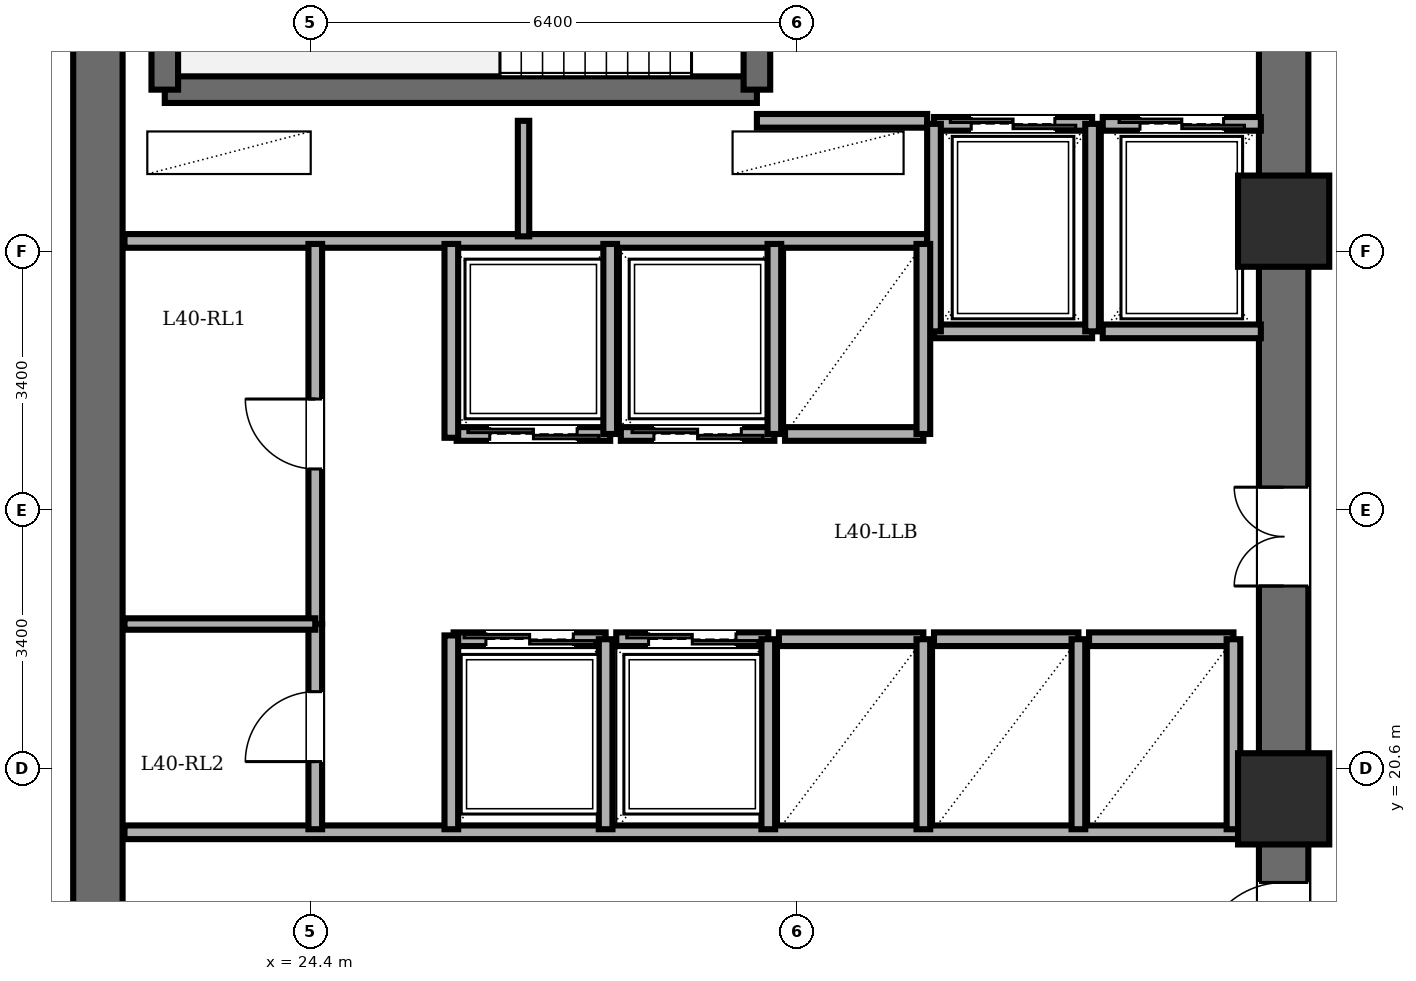
"""IFC4 building model, lengths in metres.
Left out: names, types, materials, properties, quantities, classifications, styles, units other than length and angle.
Written with IfcOpenShell. Run it as: python <this file> out.ifc"""

import sys

from ifc_helpers import new_model, si_unit, direction, frame, frame_2d, origin, origin_2d, place, context, subcontext, project, spatial, rectangle, extrude, element, fill, save


model = new_model("IFC4")
c1 = context("Model", 3, precision=1e-05, world=origin(), true_north=direction((0.0, 1.0)))
c2 = subcontext(c1, "Body", "Model", "MODEL_VIEW")
j1 = project(units=[si_unit("LENGTHUNIT", "METRE"), si_unit("PLANEANGLEUNIT", "RADIAN")], contexts=[c1])
p1 = place(None, origin())
s1 = spatial("IfcSite", under=j1, at=p1, CompositionType="ELEMENT")
p2 = place(p1, origin())
s2 = spatial("IfcBuilding", under=s1, at=p2, CompositionType="ELEMENT")
p3 = place(p2, frame((0.0, 0.0, 154.6)))
s3 = spatial("IfcBuildingStorey", under=s2, at=p3, CompositionType="ELEMENT", Elevation=154.6)
for number, where, z_axis, x_axis in (
    (1, (37.2, 20.2, 0.0), (0.0, 0.0, 1.0), (1.0, 0.0, 0.0)),
    (2, (37.2, 27.8, 0.0), (0.0, 0.0, 1.0), (1.0, 0.0, 0.0)),
):
    element("IfcColumn", number, at=place(p3, frame(where, z_axis=z_axis, x_axis=x_axis)), inside=s3, PredefinedType="COLUMN", context=c2, shape_type="SweptSolid", body=[
        extrude(rectangle(XDim=1.2, YDim=1.2, at=origin_2d()), origin(), (0.0, 0.0, 1.0), 3.6),
    ])
p4 = place(p3, frame((21.6, 14.4, 0.0), z_axis=(0.0, 0.0, 1.0), x_axis=(0.0, 1.0, 0.0)))
e3 = element("IfcWall", 3, at=p4, inside=s3, PredefinedType="SHEAR", context=c2, shape_type="SweptSolid", body=[
    extrude(rectangle(XDim=19.2, YDim=0.65, at=frame_2d((9.6, 0.0))), origin(), (0.0, 0.0, 1.0), 3.4),
])
p5 = place(p3, frame((37.2, 14.4, 0.0), z_axis=(0.0, 0.0, 1.0), x_axis=(0.0, 1.0, 0.0)))
e4 = element("IfcWall", 4, at=p5, inside=s3, PredefinedType="SHEAR", context=c2, shape_type="SweptSolid", body=[
    extrude(rectangle(XDim=19.2, YDim=0.65, at=frame_2d((9.6, 0.0))), origin(), (0.0, 0.0, 1.0), 3.4),
])
p6 = place(p5, frame((15.8, 0.0, 0.0)))
e5 = element("IfcOpeningElement", 5, at=p6, cuts=e4, PredefinedType="OPENING", context=c2, shape_type="SweptSolid", body=[
    extrude(rectangle(XDim=1.15, YDim=2.15, at=frame_2d((0.575, 1.075))), frame((0.0, 0.335, 0.0), z_axis=(0.0, -1.0, 0.0), x_axis=(1.0, 0.0, 0.0)), (0.0, 0.0, 1.0), 0.67),
])
p7 = place(p5, frame((3.6, 0.0, 0.0)))
e6 = element("IfcOpeningElement", 6, at=p7, cuts=e4, PredefinedType="OPENING", context=c2, shape_type="SweptSolid", body=[
    extrude(rectangle(XDim=1.1, YDim=2.15, at=frame_2d((0.55, 1.075))), frame((0.0, 0.335, 0.0), z_axis=(0.0, -1.0, 0.0), x_axis=(1.0, 0.0, 0.0)), (0.0, 0.0, 1.0), 0.67),
])
p8 = place(p5, frame((8.6, 0.0, 0.0)))
e7 = element("IfcOpeningElement", 7, at=p8, cuts=e4, PredefinedType="OPENING", context=c2, shape_type="SweptSolid", body=[
    extrude(rectangle(XDim=1.3, YDim=2.2, at=frame_2d((0.65, 1.1))), frame((0.0, 0.335, 0.0), z_axis=(0.0, -1.0, 0.0), x_axis=(1.0, 0.0, 0.0)), (0.0, 0.0, 1.0), 0.67),
])
p9 = place(p3, frame((22.48, 29.53, 0.0), z_axis=(0.0, 0.0, 1.0), x_axis=(1.0, 0.0, 0.0)))
e8 = element("IfcWall", 8, at=p9, inside=s3, PredefinedType="SOLIDWALL", context=c2, shape_type="SweptSolid", body=[
    extrude(rectangle(XDim=7.79, YDim=0.35, at=frame_2d((3.895, 0.0))), origin(), (0.0, 0.0, 1.0), 3.4),
])
p10 = place(p3, frame((22.48, 29.53, 0.0), z_axis=(0.0, 0.0, 1.0), x_axis=(0.0, 1.0, 0.0)))
e9 = element("IfcWall", 9, at=p10, inside=s3, PredefinedType="SOLIDWALL", context=c2, shape_type="SweptSolid", body=[
    extrude(rectangle(XDim=3.58, YDim=0.35, at=frame_2d((1.79, 0.0))), origin(), (0.0, 0.0, 1.0), 3.4),
])
p11 = place(p3, frame((30.27, 29.53, 0.0), z_axis=(0.0, 0.0, 1.0), x_axis=(0.0, 1.0, 0.0)))
e10 = element("IfcWall", 10, at=p11, inside=s3, PredefinedType="SOLIDWALL", context=c2, shape_type="SweptSolid", body=[
    extrude(rectangle(XDim=3.58, YDim=0.35, at=frame_2d((1.79, 0.0))), origin(), (0.0, 0.0, 1.0), 3.4),
])
p12 = place(p11, frame((1.25, 0.0, 0.0)))
e11 = element("IfcOpeningElement", 11, at=p12, cuts=e10, PredefinedType="OPENING", context=c2, shape_type="SweptSolid", body=[
    extrude(rectangle(XDim=1.1, YDim=2.15, at=frame_2d((0.55, 1.075))), frame((0.0, 0.185, 0.0), z_axis=(0.0, -1.0, 0.0), x_axis=(1.0, 0.0, 0.0)), (0.0, 0.0, 1.0), 0.37),
])
p13 = place(p3, frame((30.27, 29.12, 0.0), z_axis=(0.0, 0.0, 1.0), x_axis=(1.0, 0.0, 0.0)))
e12 = element("IfcWall", 12, at=p13, inside=s3, PredefinedType="PARTITIONING", context=c2, shape_type="SweptSolid", body=[
    extrude(rectangle(XDim=2.24, YDim=0.18, at=frame_2d((1.12, 0.0))), origin(), (0.0, 0.0, 1.0), 3.4),
])
p14 = place(p3, frame((21.95, 27.54, 0.0), z_axis=(0.0, 0.0, 1.0), x_axis=(1.0, 0.0, 0.0)))
e13 = element("IfcWall", 13, at=p14, inside=s3, PredefinedType="PARTITIONING", context=c2, shape_type="SweptSolid", body=[
    extrude(rectangle(XDim=10.56, YDim=0.18, at=frame_2d((5.28, 0.0))), origin(), (0.0, 0.0, 1.0), 3.4),
])
p15 = place(p3, frame((27.2, 27.6, 0.0), z_axis=(0.0, 0.0, 1.0), x_axis=(0.0, 1.0, 0.0)))
e14 = element("IfcWall", 14, at=p15, inside=s3, PredefinedType="PARTITIONING", context=c2, shape_type="SweptSolid", body=[
    extrude(rectangle(XDim=1.52, YDim=0.15, at=frame_2d((0.76, 0.0))), origin(), (0.0, 0.0, 1.0), 3.4),
])
p16 = place(p3, frame((21.95, 19.76, 0.0), z_axis=(0.0, 0.0, 1.0), x_axis=(1.0, 0.0, 0.0)))
e15 = element("IfcWall", 15, at=p16, inside=s3, PredefinedType="PARTITIONING", context=c2, shape_type="SweptSolid", body=[
    extrude(rectangle(XDim=14.87, YDim=0.18, at=frame_2d((7.435, 0.0))), origin(), (0.0, 0.0, 1.0), 3.4),
])
p17 = place(p3, frame((32.6, 29.08, 0.0), z_axis=(0.0, 0.0, 1.0), x_axis=(1.0, 0.0, 0.0)))
e16 = element("IfcWall", 16, at=p17, inside=s3, PredefinedType="PARTITIONING", context=c2, shape_type="SweptSolid", body=[
    extrude(rectangle(XDim=2.08, YDim=0.18, at=frame_2d((1.04, 0.0))), origin(), (0.0, 0.0, 1.0), 3.4),
])
p18 = place(p17, frame((0.49, 0.0, 0.0)))
e17 = element("IfcOpeningElement", 17, at=p18, cuts=e16, PredefinedType="OPENING", context=c2, shape_type="SweptSolid", body=[
    extrude(rectangle(XDim=1.1, YDim=2.2, at=frame_2d((0.55, 1.1))), frame((0.0, 0.1, 0.0), z_axis=(0.0, -1.0, 0.0), x_axis=(1.0, 0.0, 0.0)), (0.0, 0.0, 1.0), 0.2),
])
p19 = place(p3, frame((34.68, 26.35, 0.0), z_axis=(0.0, 0.0, 1.0), x_axis=(-1.0, 0.0, 0.0)))
e18 = element("IfcWall", 18, at=p19, inside=s3, PredefinedType="PARTITIONING", context=c2, shape_type="SweptSolid", body=[
    extrude(rectangle(XDim=2.08, YDim=0.18, at=frame_2d((1.04, 0.0))), origin(), (0.0, 0.0, 1.0), 3.4),
])
for number, where, z_axis, x_axis in (
    (19, (34.68, 26.35, 0.0), (0.0, 0.0, 1.0), (0.0, 1.0, 0.0)),
    (20, (32.6, 29.08, 0.0), (0.0, 0.0, 1.0), (0.0, -1.0, 0.0)),
):
    element("IfcWall", number, at=place(p3, frame(where, z_axis=z_axis, x_axis=x_axis)), inside=s3, PredefinedType="PARTITIONING", context=c2, shape_type="SweptSolid", body=[
        extrude(rectangle(XDim=2.73, YDim=0.18, at=frame_2d((1.365, 0.0))), origin(), (0.0, 0.0, 1.0), 3.4),
    ])
p20 = place(p3, frame((34.82, 29.08, 0.0), z_axis=(0.0, 0.0, 1.0), x_axis=(1.0, 0.0, 0.0)))
e21 = element("IfcWall", 21, at=p20, inside=s3, PredefinedType="PARTITIONING", context=c2, shape_type="SweptSolid", body=[
    extrude(rectangle(XDim=2.08, YDim=0.18, at=frame_2d((1.04, 0.0))), origin(), (0.0, 0.0, 1.0), 3.4),
])
p21 = place(p20, frame((0.49, 0.0, 0.0)))
e22 = element("IfcOpeningElement", 22, at=p21, cuts=e21, PredefinedType="OPENING", context=c2, shape_type="SweptSolid", body=[
    extrude(rectangle(XDim=1.1, YDim=2.2, at=frame_2d((0.55, 1.1))), frame((0.0, 0.1, 0.0), z_axis=(0.0, -1.0, 0.0), x_axis=(1.0, 0.0, 0.0)), (0.0, 0.0, 1.0), 0.2),
])
p22 = place(p3, frame((36.9, 26.35, 0.0), z_axis=(0.0, 0.0, 1.0), x_axis=(-1.0, 0.0, 0.0)))
e23 = element("IfcWall", 23, at=p22, inside=s3, PredefinedType="PARTITIONING", context=c2, shape_type="SweptSolid", body=[
    extrude(rectangle(XDim=2.08, YDim=0.18, at=frame_2d((1.04, 0.0))), origin(), (0.0, 0.0, 1.0), 3.4),
])
p23 = place(p3, frame((28.34, 25.0, 0.0), z_axis=(0.0, 0.0, 1.0), x_axis=(-1.0, 0.0, 0.0)))
e24 = element("IfcWall", 24, at=p23, inside=s3, PredefinedType="PARTITIONING", context=c2, shape_type="SweptSolid", body=[
    extrude(rectangle(XDim=2.02, YDim=0.18, at=frame_2d((1.01, 0.0))), origin(), (0.0, 0.0, 1.0), 3.4),
])
p24 = place(p23, frame((0.435, 0.0, 0.0)))
e25 = element("IfcOpeningElement", 25, at=p24, cuts=e24, PredefinedType="OPENING", context=c2, shape_type="SweptSolid", body=[
    extrude(rectangle(XDim=1.15, YDim=2.2, at=frame_2d((0.575, 1.1))), frame((0.0, 0.1, 0.0), z_axis=(0.0, -1.0, 0.0), x_axis=(1.0, 0.0, 0.0)), (0.0, 0.0, 1.0), 0.2),
])
p25 = place(p3, frame((28.34, 25.0, 0.0), z_axis=(0.0, 0.0, 1.0), x_axis=(0.0, 1.0, 0.0)))
e26 = element("IfcWall", 26, at=p25, inside=s3, PredefinedType="PARTITIONING", context=c2, shape_type="SweptSolid", body=[
    extrude(rectangle(XDim=2.5, YDim=0.18, at=frame_2d((1.25, 0.0))), origin(), (0.0, 0.0, 1.0), 3.4),
])
p26 = place(p3, frame((30.5, 25.0, 0.0), z_axis=(0.0, 0.0, 1.0), x_axis=(-1.0, 0.0, 0.0)))
e27 = element("IfcWall", 27, at=p26, inside=s3, PredefinedType="PARTITIONING", context=c2, shape_type="SweptSolid", body=[
    extrude(rectangle(XDim=2.02, YDim=0.18, at=frame_2d((1.01, 0.0))), origin(), (0.0, 0.0, 1.0), 3.4),
])
p27 = place(p26, frame((0.435, 0.0, 0.0)))
e28 = element("IfcOpeningElement", 28, at=p27, cuts=e27, PredefinedType="OPENING", context=c2, shape_type="SweptSolid", body=[
    extrude(rectangle(XDim=1.15, YDim=2.2, at=frame_2d((0.575, 1.1))), frame((0.0, 0.1, 0.0), z_axis=(0.0, -1.0, 0.0), x_axis=(1.0, 0.0, 0.0)), (0.0, 0.0, 1.0), 0.2),
])
p28 = place(p3, frame((30.5, 25.0, 0.0), z_axis=(0.0, 0.0, 1.0), x_axis=(0.0, 1.0, 0.0)))
e29 = element("IfcWall", 29, at=p28, inside=s3, PredefinedType="PARTITIONING", context=c2, shape_type="SweptSolid", body=[
    extrude(rectangle(XDim=2.5, YDim=0.18, at=frame_2d((1.25, 0.0))), origin(), (0.0, 0.0, 1.0), 3.4),
])
p29 = place(p3, frame((26.28, 22.3, 0.0), z_axis=(0.0, 0.0, 1.0), x_axis=(1.0, 0.0, 0.0)))
e30 = element("IfcWall", 30, at=p29, inside=s3, PredefinedType="PARTITIONING", context=c2, shape_type="SweptSolid", body=[
    extrude(rectangle(XDim=2.0, YDim=0.18, at=frame_2d((1.0, 0.0))), origin(), (0.0, 0.0, 1.0), 3.4),
])
p30 = place(p29, frame((0.425, 0.0, 0.0)))
e31 = element("IfcOpeningElement", 31, at=p30, cuts=e30, PredefinedType="OPENING", context=c2, shape_type="SweptSolid", body=[
    extrude(rectangle(XDim=1.15, YDim=2.2, at=frame_2d((0.575, 1.1))), frame((0.0, 0.1, 0.0), z_axis=(0.0, -1.0, 0.0), x_axis=(1.0, 0.0, 0.0)), (0.0, 0.0, 1.0), 0.2),
])
p31 = place(p3, frame((28.28, 19.8, 0.0), z_axis=(0.0, 0.0, 1.0), x_axis=(0.0, 1.0, 0.0)))
e32 = element("IfcWall", 32, at=p31, inside=s3, PredefinedType="PARTITIONING", context=c2, shape_type="SweptSolid", body=[
    extrude(rectangle(XDim=2.5, YDim=0.18, at=frame_2d((1.25, 0.0))), origin(), (0.0, 0.0, 1.0), 3.4),
])
p32 = place(p3, frame((28.42, 22.3, 0.0), z_axis=(0.0, 0.0, 1.0), x_axis=(1.0, 0.0, 0.0)))
e33 = element("IfcWall", 33, at=p32, inside=s3, PredefinedType="PARTITIONING", context=c2, shape_type="SweptSolid", body=[
    extrude(rectangle(XDim=2.0, YDim=0.18, at=frame_2d((1.0, 0.0))), origin(), (0.0, 0.0, 1.0), 3.4),
])
p33 = place(p32, frame((0.425, 0.0, 0.0)))
e34 = element("IfcOpeningElement", 34, at=p33, cuts=e33, PredefinedType="OPENING", context=c2, shape_type="SweptSolid", body=[
    extrude(rectangle(XDim=1.15, YDim=2.2, at=frame_2d((0.575, 1.1))), frame((0.0, 0.1, 0.0), z_axis=(0.0, -1.0, 0.0), x_axis=(1.0, 0.0, 0.0)), (0.0, 0.0, 1.0), 0.2),
])
p34 = place(p3, frame((30.42, 19.8, 0.0), z_axis=(0.0, 0.0, 1.0), x_axis=(0.0, 1.0, 0.0)))
e35 = element("IfcWall", 35, at=p34, inside=s3, PredefinedType="PARTITIONING", context=c2, shape_type="SweptSolid", body=[
    extrude(rectangle(XDim=2.5, YDim=0.18, at=frame_2d((1.25, 0.0))), origin(), (0.0, 0.0, 1.0), 3.4),
])
p35 = place(p3, frame((32.46, 25.0, 0.0), z_axis=(0.0, 0.0, 1.0), x_axis=(-1.0, 0.0, 0.0)))
e36 = element("IfcWall", 36, at=p35, inside=s3, PredefinedType="PARTITIONING", context=c2, shape_type="SweptSolid", body=[
    extrude(rectangle(XDim=1.82, YDim=0.18, at=frame_2d((0.91, 0.0))), origin(), (0.0, 0.0, 1.0), 3.4),
])
p36 = place(p3, frame((32.46, 25.0, 0.0), z_axis=(0.0, 0.0, 1.0), x_axis=(0.0, 1.0, 0.0)))
e37 = element("IfcWall", 37, at=p36, inside=s3, PredefinedType="PARTITIONING", context=c2, shape_type="SweptSolid", body=[
    extrude(rectangle(XDim=2.5, YDim=0.18, at=frame_2d((1.25, 0.0))), origin(), (0.0, 0.0, 1.0), 3.4),
])
p37 = place(p3, frame((30.56, 22.3, 0.0), z_axis=(0.0, 0.0, 1.0), x_axis=(1.0, 0.0, 0.0)))
e38 = element("IfcWall", 38, at=p37, inside=s3, PredefinedType="PARTITIONING", context=c2, shape_type="SweptSolid", body=[
    extrude(rectangle(XDim=1.9, YDim=0.18, at=frame_2d((0.95, 0.0))), origin(), (0.0, 0.0, 1.0), 3.4),
])
p38 = place(p3, frame((32.46, 19.8, 0.0), z_axis=(0.0, 0.0, 1.0), x_axis=(0.0, 1.0, 0.0)))
e39 = element("IfcWall", 39, at=p38, inside=s3, PredefinedType="PARTITIONING", context=c2, shape_type="SweptSolid", body=[
    extrude(rectangle(XDim=2.5, YDim=0.18, at=frame_2d((1.25, 0.0))), origin(), (0.0, 0.0, 1.0), 3.4),
])
p39 = place(p3, frame((32.6, 22.3, 0.0), z_axis=(0.0, 0.0, 1.0), x_axis=(1.0, 0.0, 0.0)))
e40 = element("IfcWall", 40, at=p39, inside=s3, PredefinedType="PARTITIONING", context=c2, shape_type="SweptSolid", body=[
    extrude(rectangle(XDim=1.9, YDim=0.18, at=frame_2d((0.95, 0.0))), origin(), (0.0, 0.0, 1.0), 3.4),
])
p40 = place(p3, frame((34.5, 19.8, 0.0), z_axis=(0.0, 0.0, 1.0), x_axis=(0.0, 1.0, 0.0)))
e41 = element("IfcWall", 41, at=p40, inside=s3, PredefinedType="PARTITIONING", context=c2, shape_type="SweptSolid", body=[
    extrude(rectangle(XDim=2.5, YDim=0.18, at=frame_2d((1.25, 0.0))), origin(), (0.0, 0.0, 1.0), 3.4),
])
p41 = place(p3, frame((34.64, 22.3, 0.0), z_axis=(0.0, 0.0, 1.0), x_axis=(1.0, 0.0, 0.0)))
e42 = element("IfcWall", 42, at=p41, inside=s3, PredefinedType="PARTITIONING", context=c2, shape_type="SweptSolid", body=[
    extrude(rectangle(XDim=1.9, YDim=0.18, at=frame_2d((0.95, 0.0))), origin(), (0.0, 0.0, 1.0), 3.4),
])
p42 = place(p3, frame((36.54, 19.8, 0.0), z_axis=(0.0, 0.0, 1.0), x_axis=(0.0, 1.0, 0.0)))
e43 = element("IfcWall", 43, at=p42, inside=s3, PredefinedType="PARTITIONING", context=c2, shape_type="SweptSolid", body=[
    extrude(rectangle(XDim=2.5, YDim=0.18, at=frame_2d((1.25, 0.0))), origin(), (0.0, 0.0, 1.0), 3.4),
])
p43 = place(p3, frame((24.46, 22.5, 0.0), z_axis=(0.0, 0.0, 1.0), x_axis=(0.0, 1.0, 0.0)))
e44 = element("IfcWall", 44, at=p43, inside=s3, PredefinedType="PARTITIONING", context=c2, shape_type="SweptSolid", body=[
    extrude(rectangle(XDim=5.0, YDim=0.18, at=frame_2d((2.5, 0.0))), origin(), (0.0, 0.0, 1.0), 3.4),
])
p44 = place(p43, frame((2.04, 0.0, 0.0)))
e45 = element("IfcOpeningElement", 45, at=p44, cuts=e44, PredefinedType="OPENING", context=c2, shape_type="SweptSolid", body=[
    extrude(rectangle(XDim=0.92, YDim=2.1, at=frame_2d((0.46, 1.05))), frame((0.0, 0.1, 0.0), z_axis=(0.0, -1.0, 0.0), x_axis=(1.0, 0.0, 0.0)), (0.0, 0.0, 1.0), 0.2),
])
p45 = place(p3, frame((24.46, 19.8, 0.0), z_axis=(0.0, 0.0, 1.0), x_axis=(0.0, 1.0, 0.0)))
e46 = element("IfcWall", 46, at=p45, inside=s3, PredefinedType="PARTITIONING", context=c2, shape_type="SweptSolid", body=[
    extrude(rectangle(XDim=2.7, YDim=0.18, at=frame_2d((1.35, 0.0))), origin(), (0.0, 0.0, 1.0), 3.4),
])
p46 = place(p45, frame((0.89, 0.0, 0.0)))
e47 = element("IfcOpeningElement", 47, at=p46, cuts=e46, PredefinedType="OPENING", context=c2, shape_type="SweptSolid", body=[
    extrude(rectangle(XDim=0.92, YDim=2.1, at=frame_2d((0.46, 1.05))), frame((0.0, 0.1, 0.0), z_axis=(0.0, -1.0, 0.0), x_axis=(1.0, 0.0, 0.0)), (0.0, 0.0, 1.0), 0.2),
])
p47 = place(p3, frame((21.95, 22.5, 0.0), z_axis=(0.0, 0.0, 1.0), x_axis=(1.0, 0.0, 0.0)))
e48 = element("IfcWall", 48, at=p47, inside=s3, PredefinedType="PARTITIONING", context=c2, shape_type="SweptSolid", body=[
    extrude(rectangle(XDim=2.51, YDim=0.15, at=frame_2d((1.255, 0.0))), origin(), (0.0, 0.0, 1.0), 3.4),
])
for number, where, z_axis, x_axis in (
    (49, (26.25, 24.95, 0.0), (0.0, 0.0, 1.0), (0.0, 1.0, 0.0)),
    (50, (26.25, 19.8, 0.0), (0.0, 0.0, 1.0), (0.0, 1.0, 0.0)),
):
    element("IfcWall", number, at=place(p3, frame(where, z_axis=z_axis, x_axis=x_axis)), inside=s3, PredefinedType="PARTITIONING", context=c2, shape_type="SweptSolid", body=[
        extrude(rectangle(XDim=2.55, YDim=0.18, at=frame_2d((1.275, 0.0))), origin(), (0.0, 0.0, 1.0), 3.4),
    ])
p48 = place(p7, origin())
e51 = element("IfcDoor", 51, at=p48, inside=s3, OperationType="SINGLE_SWING_LEFT", PredefinedType="DOOR", context=c2, shape_type="SweptSolid", body=[
    extrude(rectangle(XDim=1.1, YDim=2.15, at=frame_2d((0.55, 1.075))), frame((0.0, 0.025, 0.0), z_axis=(0.0, -1.0, 0.0), x_axis=(1.0, 0.0, 0.0)), (0.0, 0.0, 1.0), 0.05),
])
fill(e6, e51)
p49 = place(p18, origin())
e52 = element("IfcDoor", 52, at=p49, inside=s3, OperationType="DOUBLE_DOOR_SLIDING", PredefinedType="DOOR", context=c2, shape_type="SweptSolid", body=[
    extrude(rectangle(XDim=1.1, YDim=2.2, at=frame_2d((0.55, 1.1))), frame((0.0, 0.025, 0.0), z_axis=(0.0, -1.0, 0.0), x_axis=(1.0, 0.0, 0.0)), (0.0, 0.0, 1.0), 0.05),
])
fill(e17, e52)
p50 = place(p21, origin())
e53 = element("IfcDoor", 53, at=p50, inside=s3, OperationType="DOUBLE_DOOR_SLIDING", PredefinedType="DOOR", context=c2, shape_type="SweptSolid", body=[
    extrude(rectangle(XDim=1.1, YDim=2.2, at=frame_2d((0.55, 1.1))), frame((0.0, 0.025, 0.0), z_axis=(0.0, -1.0, 0.0), x_axis=(1.0, 0.0, 0.0)), (0.0, 0.0, 1.0), 0.05),
])
fill(e22, e53)
p51 = place(p24, origin())
e54 = element("IfcDoor", 54, at=p51, inside=s3, OperationType="DOUBLE_DOOR_SLIDING", PredefinedType="DOOR", context=c2, shape_type="SweptSolid", body=[
    extrude(rectangle(XDim=1.15, YDim=2.2, at=frame_2d((0.575, 1.1))), frame((0.0, 0.025, 0.0), z_axis=(0.0, -1.0, 0.0), x_axis=(1.0, 0.0, 0.0)), (0.0, 0.0, 1.0), 0.05),
])
fill(e25, e54)
p52 = place(p27, origin())
e55 = element("IfcDoor", 55, at=p52, inside=s3, OperationType="DOUBLE_DOOR_SLIDING", PredefinedType="DOOR", context=c2, shape_type="SweptSolid", body=[
    extrude(rectangle(XDim=1.15, YDim=2.2, at=frame_2d((0.575, 1.1))), frame((0.0, 0.025, 0.0), z_axis=(0.0, -1.0, 0.0), x_axis=(1.0, 0.0, 0.0)), (0.0, 0.0, 1.0), 0.05),
])
fill(e28, e55)
p53 = place(p30, origin())
e56 = element("IfcDoor", 56, at=p53, inside=s3, OperationType="DOUBLE_DOOR_SLIDING", PredefinedType="DOOR", context=c2, shape_type="SweptSolid", body=[
    extrude(rectangle(XDim=1.15, YDim=2.2, at=frame_2d((0.575, 1.1))), frame((0.0, 0.025, 0.0), z_axis=(0.0, -1.0, 0.0), x_axis=(1.0, 0.0, 0.0)), (0.0, 0.0, 1.0), 0.05),
])
fill(e31, e56)
p54 = place(p33, origin())
e57 = element("IfcDoor", 57, at=p54, inside=s3, OperationType="DOUBLE_DOOR_SLIDING", PredefinedType="DOOR", context=c2, shape_type="SweptSolid", body=[
    extrude(rectangle(XDim=1.15, YDim=2.2, at=frame_2d((0.575, 1.1))), frame((0.0, 0.025, 0.0), z_axis=(0.0, -1.0, 0.0), x_axis=(1.0, 0.0, 0.0)), (0.0, 0.0, 1.0), 0.05),
])
fill(e34, e57)
p55 = place(p44, origin())
e58 = element("IfcDoor", 58, at=p55, inside=s3, OperationType="SINGLE_SWING_RIGHT", PredefinedType="DOOR", context=c2, shape_type="SweptSolid", body=[
    extrude(rectangle(XDim=0.92, YDim=2.1, at=frame_2d((0.46, 1.05))), frame((0.0, 0.025, 0.0), z_axis=(0.0, -1.0, 0.0), x_axis=(1.0, 0.0, 0.0)), (0.0, 0.0, 1.0), 0.05),
])
fill(e45, e58)
p56 = place(p46, origin())
e59 = element("IfcDoor", 59, at=p56, inside=s3, OperationType="SINGLE_SWING_LEFT", PredefinedType="DOOR", context=c2, shape_type="SweptSolid", body=[
    extrude(rectangle(XDim=0.92, YDim=2.1, at=frame_2d((0.46, 1.05))), frame((0.0, 0.025, 0.0), z_axis=(0.0, -1.0, 0.0), x_axis=(1.0, 0.0, 0.0)), (0.0, 0.0, 1.0), 0.05),
])
fill(e47, e59)
p57 = place(p8, origin())
e60 = element("IfcDoor", 60, at=p57, inside=s3, OperationType="DOUBLE_DOOR_SINGLE_SWING", PredefinedType="DOOR", context=c2, shape_type="SweptSolid", body=[
    extrude(rectangle(XDim=1.3, YDim=2.2, at=frame_2d((0.65, 1.1))), frame((0.0, 0.025, 0.0), z_axis=(0.0, -1.0, 0.0), x_axis=(1.0, 0.0, 0.0)), (0.0, 0.0, 1.0), 0.05),
])
fill(e7, e60)
save(model, sys.argv[1])
